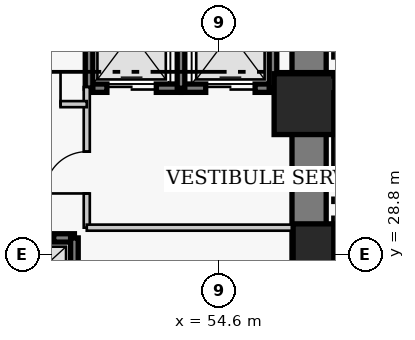
"""IFC4 building model, lengths in metres.
Left out: names, types, materials, properties, quantities, classifications, styles, units other than length and angle.
Written with IfcOpenShell. Run it as: python <this file> out.ifc"""

import sys

from ifc_helpers import new_model, si_unit, direction, frame, frame_2d, origin, origin_2d, place, context, subcontext, project, spatial, rectangle, extrude, element, fill, save


model = new_model("IFC4")
c1 = context("Model", 3, precision=1e-05, world=origin(), true_north=direction((0.0, 1.0)))
c2 = subcontext(c1, "Body", "Model", "MODEL_VIEW")
j1 = project(units=[si_unit("LENGTHUNIT", "METRE"), si_unit("PLANEANGLEUNIT", "RADIAN")], contexts=[c1])
p1 = place(None, origin())
s1 = spatial("IfcSite", under=j1, at=p1, CompositionType="ELEMENT")
p2 = place(p1, origin())
s2 = spatial("IfcBuilding", under=s1, at=p2, CompositionType="ELEMENT")
p3 = place(p2, origin())
s3 = spatial("IfcBuildingStorey", under=s2, at=p3, CompositionType="ELEMENT", Elevation=0.0)
p4 = place(p3, frame((56.97, 27.05, 0.0), z_axis=(0.0, 0.0, 1.0), x_axis=(0.0, 1.0, 0.0)))
e1 = element("IfcWall", 1, at=p4, inside=s3, PredefinedType="SHEAR", context=c2, shape_type="SweptSolid", body=[
    extrude(rectangle(XDim=13.72, YDim=0.9, at=frame_2d((6.86, 0.0))), origin(), (0.0, 0.0, 1.0), 5.4),
])
for number, where, z_axis, x_axis in (
    (2, (57.35, 28.8, 0.0), (0.0, 0.0, 1.0), (1.0, 0.0, 0.0)),
    (3, (56.85, 32.75, 0.0), (0.0, 0.0, 1.0), (1.0, 0.0, 0.0)),
):
    element("IfcColumn", number, at=place(p3, frame(where, z_axis=z_axis, x_axis=x_axis)), inside=s3, PredefinedType="COLUMN", context=c2, shape_type="SweptSolid", body=[
        extrude(rectangle(XDim=1.6, YDim=1.6, at=origin_2d()), origin(), (0.0, 0.0, 1.0), 5.4),
    ])
p5 = place(p3, frame((48.55, 29.23, 0.0), z_axis=(0.0, 0.0, 1.0), x_axis=(1.0, 0.0, 0.0)))
e4 = element("IfcWall", 4, at=p5, inside=s3, PredefinedType="SHEAR", context=c2, shape_type="SweptSolid", body=[
    extrude(rectangle(XDim=2.245, YDim=0.22, at=frame_2d((1.123, 0.0))), origin(), (0.0, 0.0, 1.0), 5.4),
])
p6 = place(p5, frame((0.6, 0.0, 0.0)))
e5 = element("IfcOpeningElement", 5, at=p6, cuts=e4, PredefinedType="OPENING", context=c2, shape_type="SweptSolid", body=[
    extrude(rectangle(XDim=1.1, YDim=2.15, at=frame_2d((0.55, 1.075))), frame((0.0, 0.12, 0.0), z_axis=(0.0, -1.0, 0.0), x_axis=(1.0, 0.0, 0.0)), (0.0, 0.0, 1.0), 0.24),
])
p7 = place(p3, frame((50.795, 27.17, 0.0), z_axis=(0.0, 0.0, 1.0), x_axis=(0.0, 1.0, 0.0)))
e6 = element("IfcWall", 6, at=p7, inside=s3, PredefinedType="SHEAR", context=c2, shape_type="SweptSolid", body=[
    extrude(rectangle(XDim=2.06, YDim=0.2, at=frame_2d((1.03, 0.0))), origin(), (0.0, 0.0, 1.0), 5.4),
])
p8 = place(p3, frame((51.18, 33.17, 0.0), z_axis=(0.0, 0.0, 1.0), x_axis=(1.0, 0.0, 0.0)))
e7 = element("IfcWall", 7, at=p8, inside=s3, PredefinedType="SHEAR", context=c2, shape_type="SweptSolid", body=[
    extrude(rectangle(XDim=2.42, YDim=0.22, at=frame_2d((1.21, 0.0))), origin(), (0.0, 0.0, 1.0), 5.4),
])
p9 = place(p8, frame((0.47, 0.0, 0.0)))
e8 = element("IfcOpeningElement", 8, at=p9, cuts=e7, PredefinedType="OPENING", context=c2, shape_type="SweptSolid", body=[
    extrude(rectangle(XDim=1.3, YDim=2.15, at=frame_2d((0.65, 1.075))), frame((0.0, 0.12, 0.0), z_axis=(0.0, -1.0, 0.0), x_axis=(1.0, 0.0, 0.0)), (0.0, 0.0, 1.0), 0.24),
])
p10 = place(p3, frame((51.18, 33.17, 0.0), z_axis=(0.0, 0.0, 1.0), x_axis=(0.0, 1.0, 0.0)))
e9 = element("IfcWall", 9, at=p10, inside=s3, PredefinedType="SHEAR", context=c2, shape_type="SweptSolid", body=[
    extrude(rectangle(XDim=2.86, YDim=0.2, at=frame_2d((1.43, 0.0))), origin(), (0.0, 0.0, 1.0), 5.4),
])
p11 = place(p3, frame((53.6, 33.17, 0.0), z_axis=(0.0, 0.0, 1.0), x_axis=(1.0, 0.0, 0.0)))
e10 = element("IfcWall", 10, at=p11, inside=s3, PredefinedType="SHEAR", context=c2, shape_type="SweptSolid", body=[
    extrude(rectangle(XDim=2.42, YDim=0.22, at=frame_2d((1.21, 0.0))), origin(), (0.0, 0.0, 1.0), 5.4),
])
p12 = place(p11, frame((0.65, 0.0, 0.0)))
e11 = element("IfcOpeningElement", 11, at=p12, cuts=e10, PredefinedType="OPENING", context=c2, shape_type="SweptSolid", body=[
    extrude(rectangle(XDim=1.3, YDim=2.15, at=frame_2d((0.65, 1.075))), frame((0.0, 0.12, 0.0), z_axis=(0.0, -1.0, 0.0), x_axis=(1.0, 0.0, 0.0)), (0.0, 0.0, 1.0), 0.24),
])
for number, where, z_axis, x_axis in (
    (12, (53.6, 33.17, 0.0), (0.0, 0.0, 1.0), (0.0, 1.0, 0.0)),
    (13, (56.02, 33.17, 0.0), (0.0, 0.0, 1.0), (0.0, 1.0, 0.0)),
):
    element("IfcWall", number, at=place(p3, frame(where, z_axis=z_axis, x_axis=x_axis)), inside=s3, PredefinedType="SHEAR", context=c2, shape_type="SweptSolid", body=[
        extrude(rectangle(XDim=2.86, YDim=0.2, at=frame_2d((1.43, 0.0))), origin(), (0.0, 0.0, 1.0), 5.4),
    ])
p13 = place(p3, frame((51.12, 29.5, 0.0), z_axis=(0.0, 0.0, 1.0), x_axis=(0.0, 1.0, 0.0)))
e14 = element("IfcWall", 14, at=p13, inside=s3, PredefinedType="PARTITIONING", context=c2, shape_type="SweptSolid", body=[
    extrude(rectangle(XDim=3.7, YDim=0.16, at=frame_2d((1.85, 0.0))), origin(), (0.0, 0.0, 1.0), 5.1),
])
p14 = place(p13, frame((0.9, 0.0, 0.0)))
e15 = element("IfcOpeningElement", 15, at=p14, cuts=e14, PredefinedType="OPENING", context=c2, shape_type="SweptSolid", body=[
    extrude(rectangle(XDim=1.1, YDim=2.15, at=frame_2d((0.55, 1.075))), frame((0.0, 0.09, 0.0), z_axis=(0.0, -1.0, 0.0), x_axis=(1.0, 0.0, 0.0)), (0.0, 0.0, 1.0), 0.18),
])
p15 = place(p3, frame((51.12, 29.5, 0.0), z_axis=(0.0, 0.0, 1.0), x_axis=(1.0, 0.0, 0.0)))
e16 = element("IfcWall", 16, at=p15, inside=s3, PredefinedType="PARTITIONING", context=c2, shape_type="SweptSolid", body=[
    extrude(rectangle(XDim=5.63, YDim=0.16, at=frame_2d((2.815, 0.0))), origin(), (0.0, 0.0, 1.0), 5.1),
])
p16 = place(p3, frame((48.92, 32.75, 0.0), z_axis=(0.0, 0.0, 1.0), x_axis=(1.0, 0.0, 0.0)))
e17 = element("IfcWall", 17, at=p16, inside=s3, PredefinedType="PARTITIONING", context=c2, shape_type="SweptSolid", body=[
    extrude(rectangle(XDim=2.2, YDim=0.16, at=frame_2d((1.1, 0.0))), origin(), (0.0, 0.0, 1.0), 5.1),
])
p17 = place(p16, frame((0.65, 0.0, 0.0)))
e18 = element("IfcOpeningElement", 18, at=p17, cuts=e17, PredefinedType="OPENING", context=c2, shape_type="SweptSolid", body=[
    extrude(rectangle(XDim=0.86, YDim=2.05, at=frame_2d((0.43, 1.025))), frame((0.0, 0.09, 0.0), z_axis=(0.0, -1.0, 0.0), x_axis=(1.0, 0.0, 0.0)), (0.0, 0.0, 1.0), 0.18),
])
p18 = place(p6, origin())
e19 = element("IfcDoor", 19, at=p18, inside=s3, OperationType="DOUBLE_DOOR_SLIDING", PredefinedType="DOOR", context=c2, shape_type="SweptSolid", body=[
    extrude(rectangle(XDim=1.1, YDim=2.15, at=frame_2d((0.55, 1.075))), frame((0.0, 0.025, 0.0), z_axis=(0.0, -1.0, 0.0), x_axis=(1.0, 0.0, 0.0)), (0.0, 0.0, 1.0), 0.05),
])
fill(e5, e19)
p19 = place(p9, origin())
e20 = element("IfcDoor", 20, at=p19, inside=s3, OperationType="DOUBLE_DOOR_SLIDING", PredefinedType="DOOR", context=c2, shape_type="SweptSolid", body=[
    extrude(rectangle(XDim=1.3, YDim=2.15, at=frame_2d((0.65, 1.075))), frame((0.0, 0.025, 0.0), z_axis=(0.0, -1.0, 0.0), x_axis=(1.0, 0.0, 0.0)), (0.0, 0.0, 1.0), 0.05),
])
fill(e8, e20)
p20 = place(p12, origin())
e21 = element("IfcDoor", 21, at=p20, inside=s3, OperationType="DOUBLE_DOOR_SLIDING", PredefinedType="DOOR", context=c2, shape_type="SweptSolid", body=[
    extrude(rectangle(XDim=1.3, YDim=2.15, at=frame_2d((0.65, 1.075))), frame((0.0, 0.025, 0.0), z_axis=(0.0, -1.0, 0.0), x_axis=(1.0, 0.0, 0.0)), (0.0, 0.0, 1.0), 0.05),
])
fill(e11, e21)
p21 = place(p14, origin())
e22 = element("IfcDoor", 22, at=p21, inside=s3, OperationType="SINGLE_SWING_LEFT", PredefinedType="DOOR", context=c2, shape_type="SweptSolid", body=[
    extrude(rectangle(XDim=1.1, YDim=2.15, at=frame_2d((0.55, 1.075))), frame((0.0, 0.025, 0.0), z_axis=(0.0, -1.0, 0.0), x_axis=(1.0, 0.0, 0.0)), (0.0, 0.0, 1.0), 0.05),
])
fill(e15, e22)
p22 = place(p17, origin())
e23 = element("IfcDoor", 23, at=p22, inside=s3, OperationType="SINGLE_SWING_RIGHT", PredefinedType="DOOR", context=c2, shape_type="SweptSolid", body=[
    extrude(rectangle(XDim=0.86, YDim=2.05, at=frame_2d((0.43, 1.025))), frame((0.0, 0.025, 0.0), z_axis=(0.0, -1.0, 0.0), x_axis=(1.0, 0.0, 0.0)), (0.0, 0.0, 1.0), 0.05),
])
fill(e18, e23)
save(model, sys.argv[1])
